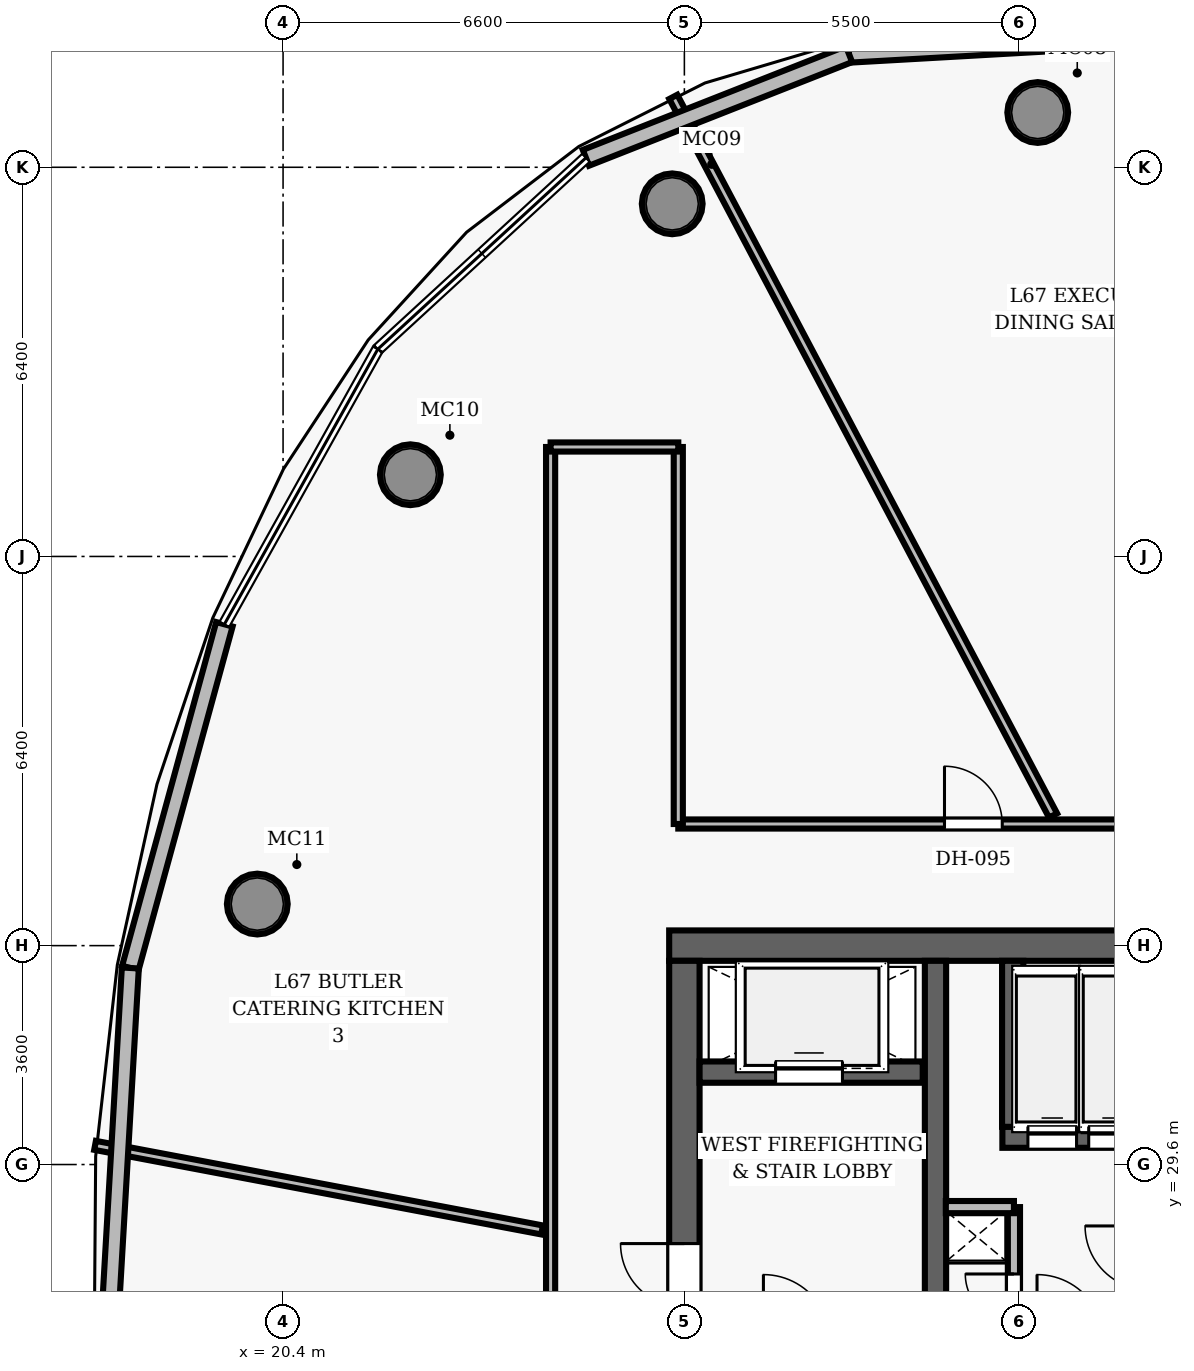
"""IFC4 building model, lengths in metres.
Left out: names, types, materials, properties, quantities, classifications, styles, units other than length and angle.
Written with IfcOpenShell. Run it as: python <this file> out.ifc"""

import sys

from ifc_helpers import new_model, si_unit, direction, frame, frame_2d, origin, origin_2d, place, context, subcontext, project, spatial, rectangle, hollow_circle, extrude, element, fill, save


model = new_model("IFC4")
c1 = context("Model", 3, precision=1e-05, world=origin(), true_north=direction((0.0, 1.0)))
c2 = subcontext(c1, "Body", "Model", "MODEL_VIEW")
j1 = project(units=[si_unit("LENGTHUNIT", "METRE"), si_unit("PLANEANGLEUNIT", "RADIAN")], contexts=[c1])
p1 = place(None, origin())
s1 = spatial("IfcSite", under=j1, at=p1, CompositionType="ELEMENT")
p2 = place(p1, origin())
s2 = spatial("IfcBuilding", under=s1, at=p2, CompositionType="ELEMENT")
p3 = place(p2, frame((0.0, 0.0, 265.15)))
s3 = spatial("IfcBuildingStorey", under=s2, at=p3, CompositionType="ELEMENT", Elevation=265.15)
p4 = place(p3, frame((26.75, 33.2, 0.0), z_axis=(0.0, 0.0, 1.0), x_axis=(1.0, 0.0, 0.0)))
e1 = element("IfcWall", 1, at=p4, inside=s3, PredefinedType="SHEAR", context=c2, shape_type="SweptSolid", body=[
    extrude(rectangle(XDim=22.5, YDim=0.5, at=frame_2d((11.25, 0.0))), origin(), (0.0, 0.0, 1.0), 3.85),
])
p5 = place(p3, frame((27.0, 19.05, 0.0), z_axis=(0.0, 0.0, 1.0), x_axis=(0.0, 1.0, 0.0)))
e2 = element("IfcWall", 2, at=p5, inside=s3, PredefinedType="SHEAR", context=c2, shape_type="SweptSolid", body=[
    extrude(rectangle(XDim=13.9, YDim=0.5, at=frame_2d((6.95, 0.0))), origin(), (0.0, 0.0, 1.0), 3.85),
])
p6 = place(p5, frame((8.2, 0.0, 0.0)))
e3 = element("IfcOpeningElement", 3, at=p6, cuts=e2, PredefinedType="OPENING", context=c2, shape_type="SweptSolid", body=[
    extrude(rectangle(XDim=1.05, YDim=2.15, at=frame_2d((0.525, 1.075))), frame((0.0, 0.26, 0.0), z_axis=(0.0, -1.0, 0.0), x_axis=(1.0, 0.0, 0.0)), (0.0, 0.0, 1.0), 0.52),
])
p7 = place(p3, frame((31.13, 19.05, 0.0), z_axis=(0.0, 0.0, 1.0), x_axis=(0.0, 1.0, 0.0)))
e4 = element("IfcWall", 4, at=p7, inside=s3, PredefinedType="SHEAR", context=c2, shape_type="SweptSolid", body=[
    extrude(rectangle(XDim=13.9, YDim=0.35, at=frame_2d((6.95, 0.0))), origin(), (0.0, 0.0, 1.0), 3.85),
])
for number, where, z_axis, x_axis in (
    (5, (32.812, 46.901, 0.0), (0.0, 0.0, 1.0), (1.0, 0.0, 0.0)),
    (6, (26.8, 45.399, 0.0), (0.0, 0.0, 1.0), (1.0, 0.0, 0.0)),
    (7, (22.494, 40.944, 0.0), (0.0, 0.0, 1.0), (1.0, 0.0, 0.0)),
    (8, (19.976, 33.884, 0.0), (0.0, 0.0, 1.0), (1.0, 0.0, 0.0)),
):
    element("IfcColumn", number, at=place(p3, frame(where, z_axis=z_axis, x_axis=x_axis)), inside=s3, PredefinedType="COLUMN", context=c2, shape_type="SweptSolid", body=[
        extrude(hollow_circle(Radius=0.5, WallThickness=0.045, at=origin_2d()), origin(), (0.0, 0.0, 1.0), 3.85),
    ])
p8 = place(p3, frame((27.25, 31.12, 0.0), z_axis=(0.0, 0.0, 1.0), x_axis=(1.0, 0.0, 0.0)))
e9 = element("IfcWall", 9, at=p8, inside=s3, PredefinedType="SHEAR", context=c2, shape_type="SweptSolid", body=[
    extrude(rectangle(XDim=3.67, YDim=0.35, at=frame_2d((1.835, 0.0))), origin(), (0.0, 0.0, 1.0), 3.04),
])
p9 = place(p8, frame((1.25, 0.0, 0.0)))
e10 = element("IfcOpeningElement", 10, at=p9, cuts=e9, PredefinedType="OPENING", context=c2, shape_type="SweptSolid", body=[
    extrude(rectangle(XDim=1.1, YDim=2.15, at=frame_2d((0.55, 1.075))), frame((0.0, 0.185, 0.0), z_axis=(0.0, -1.0, 0.0), x_axis=(1.0, 0.0, 0.0)), (0.0, 0.0, 1.0), 0.37),
])
p10 = place(p3, frame((32.23, 30.05, 0.0), z_axis=(0.0, 0.0, 1.0), x_axis=(1.0, 0.0, 0.0)))
e11 = element("IfcWall", 11, at=p10, inside=s3, PredefinedType="SHEAR", context=c2, shape_type="SweptSolid", body=[
    extrude(rectangle(XDim=2.41, YDim=0.35, at=frame_2d((1.205, 0.0))), origin(), (0.0, 0.0, 1.0), 3.04),
])
p11 = place(p10, frame((0.42, 0.0, 0.0)))
e12 = element("IfcOpeningElement", 12, at=p11, cuts=e11, PredefinedType="OPENING", context=c2, shape_type="SweptSolid", body=[
    extrude(rectangle(XDim=0.8, YDim=2.15, at=frame_2d((0.4, 1.075))), frame((0.0, 0.185, 0.0), z_axis=(0.0, -1.0, 0.0), x_axis=(1.0, 0.0, 0.0)), (0.0, 0.0, 1.0), 0.37),
])
p12 = place(p10, frame((1.42, 0.0, 0.0)))
e13 = element("IfcOpeningElement", 13, at=p12, cuts=e11, PredefinedType="OPENING", context=c2, shape_type="SweptSolid", body=[
    extrude(rectangle(XDim=0.8, YDim=2.15, at=frame_2d((0.4, 1.075))), frame((0.0, 0.185, 0.0), z_axis=(0.0, -1.0, 0.0), x_axis=(1.0, 0.0, 0.0)), (0.0, 0.0, 1.0), 0.37),
])
p13 = place(p3, frame((32.4, 30.22, 0.0), z_axis=(0.0, 0.0, 1.0), x_axis=(0.0, 1.0, 0.0)))
e14 = element("IfcWall", 14, at=p13, inside=s3, PredefinedType="SHEAR", context=c2, shape_type="SweptSolid", body=[
    extrude(rectangle(XDim=2.73, YDim=0.35, at=frame_2d((1.365, 0.0))), origin(), (0.0, 0.0, 1.0), 3.04),
])
p14 = place(p3, frame((32.42, 26.86, 0.0), z_axis=(0.0, 0.0, 1.0), x_axis=(0.0, 1.0, 0.0)))
e15 = element("IfcWall", 15, at=p14, inside=s3, PredefinedType="PARTITIONING", context=c2, shape_type="SweptSolid", body=[
    extrude(rectangle(XDim=2.04, YDim=0.2, at=frame_2d((1.02, 0.0))), origin(), (0.0, 0.0, 1.0), 3.04),
])
p15 = place(p14, frame((0.14, 0.0, 0.0)))
e16 = element("IfcOpeningElement", 16, at=p15, cuts=e15, PredefinedType="OPENING", context=c2, shape_type="SweptSolid", body=[
    extrude(rectangle(XDim=0.8, YDim=2.05, at=frame_2d((0.4, 1.025))), frame((0.0, 0.11, 0.0), z_axis=(0.0, -1.0, 0.0), x_axis=(1.0, 0.0, 0.0)), (0.0, 0.0, 1.0), 0.22),
])
p16 = place(p3, frame((31.3, 28.9, 0.0), z_axis=(0.0, 0.0, 1.0), x_axis=(1.0, 0.0, 0.0)))
e17 = element("IfcWall", 17, at=p16, inside=s3, PredefinedType="PARTITIONING", context=c2, shape_type="SweptSolid", body=[
    extrude(rectangle(XDim=1.12, YDim=0.2, at=frame_2d((0.56, 0.0))), origin(), (0.0, 0.0, 1.0), 3.04),
])
p17 = place(p3, frame((26.9, 35.2, 0.0), z_axis=(0.0, 0.0, 1.0), x_axis=(1.0, 0.0, 0.0)))
e18 = element("IfcWall", 18, at=p17, inside=s3, PredefinedType="PARTITIONING", context=c2, shape_type="SweptSolid", body=[
    extrude(rectangle(XDim=10.05, YDim=0.15, at=frame_2d((5.025, 0.0))), origin(), (0.0, 0.0, 1.0), 3.04),
])
p18 = place(p17, frame((4.378, 0.0, 0.0)))
e19 = element("IfcOpeningElement", 19, at=p18, cuts=e18, PredefinedType="OPENING", context=c2, shape_type="SweptSolid", body=[
    extrude(rectangle(XDim=0.95, YDim=2.15, at=frame_2d((0.475, 1.075))), frame((0.0, 0.085, 0.0), z_axis=(0.0, -1.0, 0.0), x_axis=(1.0, 0.0, 0.0)), (0.0, 0.0, 1.0), 0.17),
])
p19 = place(p3, frame((24.8, 10.6, 0.0), z_axis=(0.0, 0.0, 1.0), x_axis=(0.0, 1.0, 0.0)))
e20 = element("IfcWall", 20, at=p19, inside=s3, PredefinedType="PARTITIONING", context=c2, shape_type="SweptSolid", body=[
    extrude(rectangle(XDim=30.8, YDim=0.15, at=frame_2d((15.4, 0.0))), origin(), (0.0, 0.0, 1.0), 3.04),
])
p20 = place(p19, frame((12.632, 0.0, 0.0)))
e21 = element("IfcOpeningElement", 21, at=p20, cuts=e20, PredefinedType="OPENING", context=c2, shape_type="SweptSolid", body=[
    extrude(rectangle(XDim=0.95, YDim=2.15, at=frame_2d((0.475, 1.075))), frame((0.0, 0.085, 0.0), z_axis=(0.0, -1.0, 0.0), x_axis=(1.0, 0.0, 0.0)), (0.0, 0.0, 1.0), 0.17),
])
p21 = place(p3, frame((26.9, 35.2, 0.0), z_axis=(0.0, 0.0, 1.0), x_axis=(0.0, 1.0, 0.0)))
e22 = element("IfcWall", 22, at=p21, inside=s3, PredefinedType="PARTITIONING", context=c2, shape_type="SweptSolid", body=[
    extrude(rectangle(XDim=6.2, YDim=0.15, at=frame_2d((3.1, 0.0))), origin(), (0.0, 0.0, 1.0), 3.04),
])
p22 = place(p3, frame((24.8, 41.4, 0.0), z_axis=(0.0, 0.0, 1.0), x_axis=(1.0, 0.0, 0.0)))
e23 = element("IfcWall", 23, at=p22, inside=s3, PredefinedType="PARTITIONING", context=c2, shape_type="SweptSolid", body=[
    extrude(rectangle(XDim=2.1, YDim=0.15, at=frame_2d((1.05, 0.0))), origin(), (0.0, 0.0, 1.0), 3.04),
])
p23 = place(p3, frame((33.064, 35.34, 0.0), z_axis=(0.0, 0.0, 1.0), x_axis=(-0.467271634446, 0.884113804689, 0.0)))
e24 = element("IfcWall", 24, at=p23, inside=s3, PredefinedType="PARTITIONING", context=c2, shape_type="SweptSolid", body=[
    extrude(rectangle(XDim=13.367, YDim=0.15, at=frame_2d((6.683, 0.0))), origin(), (0.0, 0.0, 1.0), 3.04),
])
p24 = place(p3, frame((24.66, 28.524, 0.0), z_axis=(0.0, 0.0, 1.0), x_axis=(-0.982565735445, 0.185915506428, 0.0)))
e25 = element("IfcWall", 25, at=p24, inside=s3, PredefinedType="PARTITIONING", context=c2, shape_type="SweptSolid", body=[
    extrude(rectangle(XDim=7.482, YDim=0.15, at=frame_2d((3.741, 0.0))), origin(), (0.0, 0.0, 1.0), 3.04),
])
p25 = place(p3, frame((29.708, 47.86, 0.0), z_axis=(0.0, 0.0, 1.0), x_axis=(0.998396170021, 0.056613493871, 0.0)))
e26 = element("IfcWall", 26, at=p25, inside=s3, PredefinedType="SOLIDWALL", context=c2, shape_type="SweptSolid", body=[
    extrude(rectangle(XDim=5.179, YDim=0.28, at=frame_2d((2.59, 0.0))), origin(), (0.0, 0.0, 1.0), 3.625),
])
p26 = place(p3, frame((25.381, 46.156, 0.0), z_axis=(0.0, 0.0, 1.0), x_axis=(0.930386691725, 0.366579600988, 0.0)))
e27 = element("IfcWall", 27, at=p26, inside=s3, PredefinedType="SOLIDWALL", context=c2, shape_type="SweptSolid", body=[
    extrude(rectangle(XDim=4.651, YDim=0.28, at=frame_2d((2.325, 0.0))), origin(), (0.0, 0.0, 1.0), 3.625),
])
p27 = place(p3, frame((17.888, 32.832, 0.0), z_axis=(0.0, 0.0, 1.0), x_axis=(0.26396334097, 0.964532713092, 0.0)))
e28 = element("IfcWall", 28, at=p27, inside=s3, PredefinedType="SOLIDWALL", context=c2, shape_type="SweptSolid", body=[
    extrude(rectangle(XDim=5.86, YDim=0.28, at=frame_2d((2.93, 0.0))), origin(), (0.0, 0.0, 1.0), 3.625),
])
p28 = place(p3, frame((17.52, 26.498, 0.0), z_axis=(0.0, 0.0, 1.0), x_axis=(0.058061140862, 0.998313029025, 0.0)))
e29 = element("IfcWall", 29, at=p28, inside=s3, PredefinedType="SOLIDWALL", context=c2, shape_type="SweptSolid", body=[
    extrude(rectangle(XDim=6.345, YDim=0.28, at=frame_2d((3.173, 0.0))), origin(), (0.0, 0.0, 1.0), 3.625),
])
p29 = place(p6, origin())
e30 = element("IfcDoor", 30, at=p29, inside=s3, OperationType="SINGLE_SWING_RIGHT", PredefinedType="DOOR", context=c2, shape_type="SweptSolid", body=[
    extrude(rectangle(XDim=1.05, YDim=2.15, at=frame_2d((0.525, 1.075))), frame((0.0, 0.025, 0.0), z_axis=(0.0, -1.0, 0.0), x_axis=(1.0, 0.0, 0.0)), (0.0, 0.0, 1.0), 0.05),
])
fill(e3, e30)
p30 = place(p15, origin())
e31 = element("IfcDoor", 31, at=p30, inside=s3, OperationType="SINGLE_SWING_RIGHT", PredefinedType="DOOR", context=c2, shape_type="SweptSolid", body=[
    extrude(rectangle(XDim=0.8, YDim=2.05, at=frame_2d((0.4, 1.025))), frame((0.0, 0.025, 0.0), z_axis=(0.0, -1.0, 0.0), x_axis=(1.0, 0.0, 0.0)), (0.0, 0.0, 1.0), 0.05),
])
fill(e16, e31)
p31 = place(p18, origin())
e32 = element("IfcDoor", 32, at=p31, inside=s3, OperationType="SINGLE_SWING_LEFT", PredefinedType="DOOR", context=c2, shape_type="SweptSolid", body=[
    extrude(rectangle(XDim=0.95, YDim=2.15, at=frame_2d((0.475, 1.075))), frame((0.0, 0.025, 0.0), z_axis=(0.0, -1.0, 0.0), x_axis=(1.0, 0.0, 0.0)), (0.0, 0.0, 1.0), 0.05),
])
fill(e19, e32)
p32 = place(p9, origin())
e33 = element("IfcDoor", 33, at=p32, inside=s3, OperationType="SLIDING_TO_LEFT", PredefinedType="DOOR", context=c2, shape_type="SweptSolid", body=[
    extrude(rectangle(XDim=1.1, YDim=2.15, at=frame_2d((0.55, 1.075))), frame((0.0, 0.025, 0.0), z_axis=(0.0, -1.0, 0.0), x_axis=(1.0, 0.0, 0.0)), (0.0, 0.0, 1.0), 0.05),
])
fill(e10, e33)
p33 = place(p11, origin())
e34 = element("IfcDoor", 34, at=p33, inside=s3, OperationType="SLIDING_TO_LEFT", PredefinedType="DOOR", context=c2, shape_type="SweptSolid", body=[
    extrude(rectangle(XDim=0.8, YDim=2.15, at=frame_2d((0.4, 1.075))), frame((0.0, 0.025, 0.0), z_axis=(0.0, -1.0, 0.0), x_axis=(1.0, 0.0, 0.0)), (0.0, 0.0, 1.0), 0.05),
])
fill(e12, e34)
p34 = place(p12, origin())
e35 = element("IfcDoor", 35, at=p34, inside=s3, OperationType="SLIDING_TO_LEFT", PredefinedType="DOOR", context=c2, shape_type="SweptSolid", body=[
    extrude(rectangle(XDim=0.8, YDim=2.15, at=frame_2d((0.4, 1.075))), frame((0.0, 0.025, 0.0), z_axis=(0.0, -1.0, 0.0), x_axis=(1.0, 0.0, 0.0)), (0.0, 0.0, 1.0), 0.05),
])
fill(e13, e35)
save(model, sys.argv[1])
